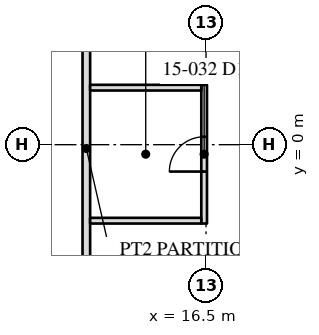
"""IFC4 building model, lengths in metres.
Left out: names, types, materials, properties, quantities, classifications, styles, units other than length and angle.
Written with IfcOpenShell. Run it as: python <this file> out.ifc"""

import sys

from ifc_helpers import new_model, si_unit, direction, frame, frame_2d, origin, place, context, subcontext, project, spatial, rectangle, extrude, element, fill, save


model = new_model("IFC4")
c1 = context("Model", 3, precision=1e-05, world=origin(), true_north=direction((0.0, 1.0)))
c2 = subcontext(c1, "Body", "Model", "MODEL_VIEW")
j1 = project(units=[si_unit("LENGTHUNIT", "METRE"), si_unit("PLANEANGLEUNIT", "RADIAN")], contexts=[c1])
p1 = place(None, origin())
s1 = spatial("IfcSite", under=j1, at=p1, CompositionType="ELEMENT")
p2 = place(p1, origin())
s2 = spatial("IfcBuilding", under=s1, at=p2, CompositionType="ELEMENT")
p3 = place(p2, frame((0.0, 0.0, 65.2)))
s3 = spatial("IfcBuildingStorey", under=s2, at=p3, CompositionType="ELEMENT", Elevation=65.2)
p4 = place(p3, frame((13.35, -13.45, 0.0), z_axis=(0.0, 0.0, 1.0), x_axis=(0.0, 1.0, 0.0)))
e1 = element("IfcWall", 1, at=p4, inside=s3, PredefinedType="PARTITIONING", context=c2, shape_type="SweptSolid", body=[
    extrude(rectangle(XDim=26.7, YDim=0.2, at=frame_2d((13.35, 0.0))), origin(), (0.0, 0.0, 1.0), 3.91),
])
p5 = place(p4, frame((5.992, 0.0, 0.0)))
e2 = element("IfcOpeningElement", 2, at=p5, cuts=e1, PredefinedType="OPENING", context=c2, shape_type="SweptSolid", body=[
    extrude(rectangle(XDim=0.915, YDim=2.134, at=frame_2d((0.458, 1.067))), frame((0.0, 0.11, 0.0), z_axis=(0.0, -1.0, 0.0), x_axis=(1.0, 0.0, 0.0)), (0.0, 0.0, 1.0), 0.22),
])
p6 = place(p3, frame((16.45, -2.075, 0.0), z_axis=(0.0, 0.0, 1.0), x_axis=(0.0, 1.0, 0.0)))
e3 = element("IfcWall", 3, at=p6, inside=s3, PredefinedType="PARTITIONING", context=c2, shape_type="SweptSolid", body=[
    extrude(rectangle(XDim=3.65, YDim=0.15, at=frame_2d((1.825, 0.0))), origin(), (0.0, 0.0, 1.0), 3.91),
])
p7 = place(p6, frame((1.367, 0.0, 0.0)))
e4 = element("IfcOpeningElement", 4, at=p7, cuts=e3, PredefinedType="OPENING", context=c2, shape_type="SweptSolid", body=[
    extrude(rectangle(XDim=0.915, YDim=2.134, at=frame_2d((0.458, 1.067))), frame((0.0, 0.085, 0.0), z_axis=(0.0, -1.0, 0.0), x_axis=(1.0, 0.0, 0.0)), (0.0, 0.0, 1.0), 0.17),
])
for number, where, z_axis, x_axis in (
    (5, (16.375, -2.0, 0.0), (0.0, 0.0, 1.0), (-1.0, 0.0, 0.0)),
    (6, (16.375, 1.5, 0.0), (0.0, 0.0, 1.0), (-1.0, 0.0, 0.0)),
):
    element("IfcWall", number, at=place(p3, frame(where, z_axis=z_axis, x_axis=x_axis)), inside=s3, PredefinedType="PARTITIONING", context=c2, shape_type="SweptSolid", body=[
        extrude(rectangle(XDim=2.925, YDim=0.15, at=frame_2d((1.462, 0.0))), origin(), (0.0, 0.0, 1.0), 3.91),
    ])
p8 = place(p7, origin())
e7 = element("IfcDoor", 7, at=p8, inside=s3, OperationType="SINGLE_SWING_LEFT", PredefinedType="DOOR", context=c2, shape_type="SweptSolid", body=[
    extrude(rectangle(XDim=0.915, YDim=2.134, at=frame_2d((0.458, 1.067))), frame((0.0, 0.025, 0.0), z_axis=(0.0, -1.0, 0.0), x_axis=(1.0, 0.0, 0.0)), (0.0, 0.0, 1.0), 0.05),
])
fill(e4, e7)
save(model, sys.argv[1])
